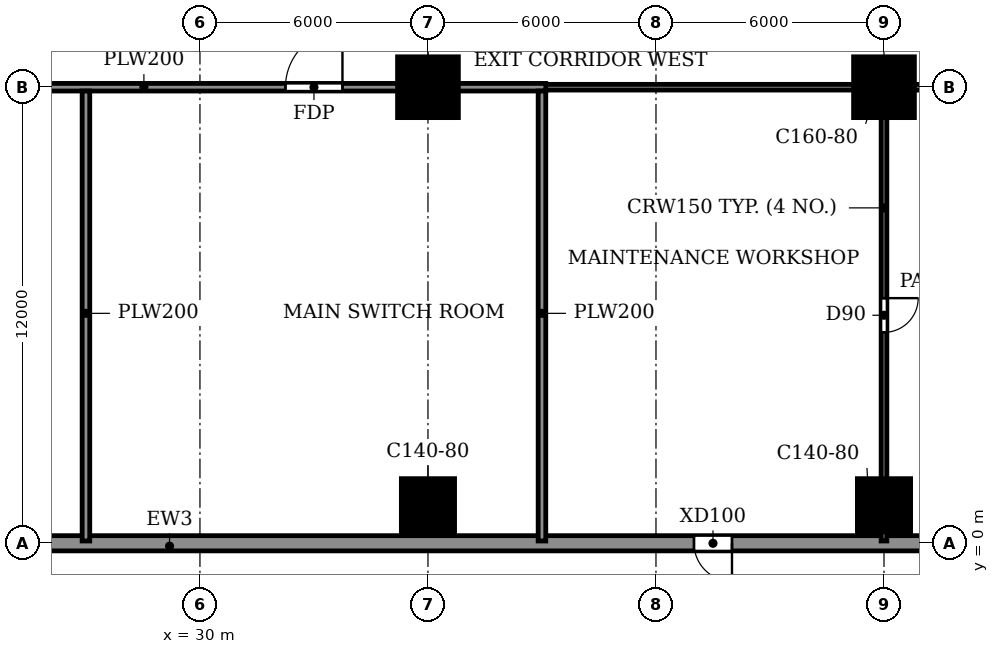
"""IFC4 building model, lengths in metres.
Left out: names, types, materials, properties, quantities, classifications, styles, units other than length and angle.
Written with IfcOpenShell. Run it as: python <this file> out.ifc"""

import sys

from ifc_helpers import new_model, si_unit, direction, frame, frame_2d, origin, origin_2d, place, context, subcontext, project, spatial, rectangle, extrude, source, transform, mapped, element, fill, save


model = new_model("IFC4")
c1 = context("Model", 3, precision=1e-05, world=origin(), true_north=direction((0.0, 1.0)))
c2 = subcontext(c1, "Body", "Model", "MODEL_VIEW")
j1 = project(units=[si_unit("LENGTHUNIT", "METRE"), si_unit("PLANEANGLEUNIT", "RADIAN")], contexts=[c1])
p1 = place(None, origin())
s1 = spatial("IfcSite", under=j1, at=p1, CompositionType="ELEMENT")
p2 = place(p1, origin())
s2 = spatial("IfcBuilding", under=s1, at=p2, CompositionType="ELEMENT")
p3 = place(p2, origin())
s3 = spatial("IfcBuildingStorey", under=s2, at=p3, CompositionType="ELEMENT", Elevation=0.0)
m1 = source(origin(), c2, "Body", "SweptSolid", [
    extrude(rectangle(XDim=1.4, YDim=1.4, at=origin_2d()), origin(), (0.0, 0.0, 1.0), 4.5),
])
p4 = place(p3, frame((36.0, 1.0, -0.3), z_axis=(0.0, 0.0, 1.0), x_axis=(1.0, 0.0, 0.0)))
e1 = element("IfcColumn", 1, at=p4, inside=s3, PredefinedType="COLUMN", context=c2, shape_type="MappedRepresentation", body=[
    mapped(m1, transform((0.0, 0.0, 0.0))),
])
m2 = source(origin(), c2, "Body", "SweptSolid", [
    extrude(rectangle(XDim=1.6, YDim=1.6, at=origin_2d()), origin(), (0.0, 0.0, 1.0), 4.5),
])
p5 = place(p3, frame((36.0, 12.0, -0.3), z_axis=(0.0, 0.0, 1.0), x_axis=(1.0, 0.0, 0.0)))
e2 = element("IfcColumn", 2, at=p5, inside=s3, PredefinedType="COLUMN", context=c2, shape_type="MappedRepresentation", body=[
    mapped(m2, transform((0.0, 0.0, 0.0))),
])
p6 = place(p3, frame((48.0, 1.0, -0.3), z_axis=(0.0, 0.0, 1.0), x_axis=(1.0, 0.0, 0.0)))
e3 = element("IfcColumn", 3, at=p6, inside=s3, PredefinedType="COLUMN", context=c2, shape_type="MappedRepresentation", body=[
    mapped(m1, transform((0.0, 0.0, 0.0))),
])
p7 = place(p3, frame((48.0, 12.0, -0.3), z_axis=(0.0, 0.0, 1.0), x_axis=(1.0, 0.0, 0.0)))
e4 = element("IfcColumn", 4, at=p7, inside=s3, PredefinedType="COLUMN", context=c2, shape_type="MappedRepresentation", body=[
    mapped(m2, transform((0.0, 0.0, 0.0))),
])
p8 = place(p3, frame((-0.2, 0.0, 0.0), z_axis=(0.0, 0.0, 1.0), x_axis=(1.0, 0.0, 0.0)))
e5 = element("IfcWall", 5, at=p8, inside=s3, PredefinedType="STANDARD", context=c2, shape_type="SweptSolid", body=[
    extrude(rectangle(XDim=102.4, YDim=0.4, at=frame_2d((51.2, 0.0))), origin(), (0.0, 0.0, 1.0), 4.2),
])
p9 = place(p8, frame((13.6, 0.0, 0.0)))
e6 = element("IfcOpeningElement", 6, at=p9, cuts=e5, PredefinedType="OPENING", context=c2, shape_type="SweptSolid", body=[
    extrude(rectangle(XDim=2.0, YDim=2.4, at=frame_2d((1.0, 1.2))), frame((0.0, 0.21, 0.0), z_axis=(0.0, -1.0, 0.0), x_axis=(1.0, 0.0, 0.0)), (0.0, 0.0, 1.0), 0.42),
])
p10 = place(p8, frame((43.2, 0.0, 0.0)))
e7 = element("IfcOpeningElement", 7, at=p10, cuts=e5, PredefinedType="OPENING", context=c2, shape_type="SweptSolid", body=[
    extrude(rectangle(XDim=1.0, YDim=2.1, at=frame_2d((0.5, 1.05))), frame((0.0, 0.21, 0.0), z_axis=(0.0, -1.0, 0.0), x_axis=(1.0, 0.0, 0.0)), (0.0, 0.0, 1.0), 0.42),
])
p11 = place(p8, frame((49.6, 0.0, 0.0)))
e8 = element("IfcOpeningElement", 8, at=p11, cuts=e5, PredefinedType="OPENING", context=c2, shape_type="SweptSolid", body=[
    extrude(rectangle(XDim=2.0, YDim=2.4, at=frame_2d((1.0, 1.2))), frame((0.0, 0.21, 0.0), z_axis=(0.0, -1.0, 0.0), x_axis=(1.0, 0.0, 0.0)), (0.0, 0.0, 1.0), 0.42),
])
p12 = place(p8, frame((55.2, 0.0, 0.0)))
e9 = element("IfcOpeningElement", 9, at=p12, cuts=e5, PredefinedType="OPENING", context=c2, shape_type="SweptSolid", body=[
    extrude(rectangle(XDim=1.0, YDim=2.1, at=frame_2d((0.5, 1.05))), frame((0.0, 0.21, 0.0), z_axis=(0.0, -1.0, 0.0), x_axis=(1.0, 0.0, 0.0)), (0.0, 0.0, 1.0), 0.42),
])
p13 = place(p8, frame((65.2, 0.0, 0.0)))
e10 = element("IfcOpeningElement", 10, at=p13, cuts=e5, PredefinedType="OPENING", context=c2, shape_type="SweptSolid", body=[
    extrude(rectangle(XDim=2.0, YDim=2.4, at=frame_2d((1.0, 1.2))), frame((0.0, 0.21, 0.0), z_axis=(0.0, -1.0, 0.0), x_axis=(1.0, 0.0, 0.0)), (0.0, 0.0, 1.0), 0.42),
])
p14 = place(p8, frame((77.2, 0.0, 0.0)))
e11 = element("IfcOpeningElement", 11, at=p14, cuts=e5, PredefinedType="OPENING", context=c2, shape_type="SweptSolid", body=[
    extrude(rectangle(XDim=2.0, YDim=2.4, at=frame_2d((1.0, 1.2))), frame((0.0, 0.21, 0.0), z_axis=(0.0, -1.0, 0.0), x_axis=(1.0, 0.0, 0.0)), (0.0, 0.0, 1.0), 0.42),
])
p15 = place(p8, frame((86.2, 0.0, 0.0)))
e12 = element("IfcOpeningElement", 12, at=p15, cuts=e5, PredefinedType="OPENING", context=c2, shape_type="SweptSolid", body=[
    extrude(rectangle(XDim=2.0, YDim=2.4, at=frame_2d((1.0, 1.2))), frame((0.0, 0.21, 0.0), z_axis=(0.0, -1.0, 0.0), x_axis=(1.0, 0.0, 0.0)), (0.0, 0.0, 1.0), 0.42),
])
p16 = place(p8, frame((90.7, 0.0, 0.0)))
e13 = element("IfcOpeningElement", 13, at=p16, cuts=e5, PredefinedType="OPENING", context=c2, shape_type="SweptSolid", body=[
    extrude(rectangle(XDim=2.0, YDim=2.4, at=frame_2d((1.0, 1.2))), frame((0.0, 0.21, 0.0), z_axis=(0.0, -1.0, 0.0), x_axis=(1.0, 0.0, 0.0)), (0.0, 0.0, 1.0), 0.42),
])
p17 = place(p8, frame((98.2, 0.0, 0.0)))
e14 = element("IfcOpeningElement", 14, at=p17, cuts=e5, PredefinedType="OPENING", context=c2, shape_type="SweptSolid", body=[
    extrude(rectangle(XDim=2.0, YDim=2.4, at=frame_2d((1.0, 1.2))), frame((0.0, 0.21, 0.0), z_axis=(0.0, -1.0, 0.0), x_axis=(1.0, 0.0, 0.0)), (0.0, 0.0, 1.0), 0.42),
])
p18 = place(p3, frame((38.9, 12.0, 0.0), z_axis=(0.0, 0.0, 1.0), x_axis=(1.0, 0.0, 0.0)))
e15 = element("IfcWall", 15, at=p18, inside=s3, PredefinedType="PARTITIONING", context=c2, shape_type="SweptSolid", body=[
    extrude(rectangle(XDim=63.1, YDim=0.15, at=frame_2d((31.55, 0.0))), origin(), (0.0, 0.0, 1.0), 4.2),
])
p19 = place(p18, frame((10.2, 0.0, 0.0)))
e16 = element("IfcOpeningElement", 16, at=p19, cuts=e15, PredefinedType="OPENING", context=c2, shape_type="SweptSolid", body=[
    extrude(rectangle(XDim=1.8, YDim=2.1, at=frame_2d((0.9, 1.05))), frame((0.0, 0.085, 0.0), z_axis=(0.0, -1.0, 0.0), x_axis=(1.0, 0.0, 0.0)), (0.0, 0.0, 1.0), 0.17),
])
p20 = place(p18, frame((23.65, 0.0, 0.0)))
e17 = element("IfcOpeningElement", 17, at=p20, cuts=e15, PredefinedType="OPENING", context=c2, shape_type="SweptSolid", body=[
    extrude(rectangle(XDim=0.9, YDim=2.1, at=frame_2d((0.45, 1.05))), frame((0.0, 0.085, 0.0), z_axis=(0.0, -1.0, 0.0), x_axis=(1.0, 0.0, 0.0)), (0.0, 0.0, 1.0), 0.17),
])
p21 = place(p18, frame((38.65, 0.0, 0.0)))
e18 = element("IfcOpeningElement", 18, at=p21, cuts=e15, PredefinedType="OPENING", context=c2, shape_type="SweptSolid", body=[
    extrude(rectangle(XDim=0.9, YDim=2.1, at=frame_2d((0.45, 1.05))), frame((0.0, 0.085, 0.0), z_axis=(0.0, -1.0, 0.0), x_axis=(1.0, 0.0, 0.0)), (0.0, 0.0, 1.0), 0.17),
])
p22 = place(p18, frame((51.7, 0.0, 0.0)))
e19 = element("IfcOpeningElement", 19, at=p22, cuts=e15, PredefinedType="OPENING", context=c2, shape_type="SweptSolid", body=[
    extrude(rectangle(XDim=1.8, YDim=2.1, at=frame_2d((0.9, 1.05))), frame((0.0, 0.085, 0.0), z_axis=(0.0, -1.0, 0.0), x_axis=(1.0, 0.0, 0.0)), (0.0, 0.0, 1.0), 0.17),
])
p23 = place(p3, frame((48.0, 0.06, 0.0), z_axis=(0.0, 0.0, 1.0), x_axis=(0.0, 1.0, 0.0)))
e20 = element("IfcWall", 20, at=p23, inside=s3, PredefinedType="PARTITIONING", context=c2, shape_type="SweptSolid", body=[
    extrude(rectangle(XDim=11.865, YDim=0.15, at=frame_2d((5.933, 0.0))), origin(), (0.0, 0.0, 1.0), 4.2),
])
p24 = place(p23, frame((5.49, 0.0, 0.0)))
e21 = element("IfcOpeningElement", 21, at=p24, cuts=e20, PredefinedType="OPENING", context=c2, shape_type="SweptSolid", body=[
    extrude(rectangle(XDim=0.9, YDim=2.1, at=frame_2d((0.45, 1.05))), frame((0.0, 0.085, 0.0), z_axis=(0.0, -1.0, 0.0), x_axis=(1.0, 0.0, 0.0)), (0.0, 0.0, 1.0), 0.17),
])
p25 = place(p3, frame((15.9, 12.0, 0.0), z_axis=(0.0, 0.0, 1.0), x_axis=(1.0, 0.0, 0.0)))
e22 = element("IfcWall", 22, at=p25, inside=s3, PredefinedType="PARTITIONING", context=c2, shape_type="SweptSolid", body=[
    extrude(rectangle(XDim=23.2, YDim=0.2, at=frame_2d((11.6, 0.0))), origin(), (0.0, 0.0, 1.0), 4.2),
])
p26 = place(p25, frame((16.35, 0.0, 0.0)))
e23 = element("IfcOpeningElement", 23, at=p26, cuts=e22, PredefinedType="OPENING", context=c2, shape_type="SweptSolid", body=[
    extrude(rectangle(XDim=1.5, YDim=2.1, at=frame_2d((0.75, 1.05))), frame((0.0, 0.11, 0.0), z_axis=(0.0, -1.0, 0.0), x_axis=(1.0, 0.0, 0.0)), (0.0, 0.0, 1.0), 0.22),
])
for number, where, z_axis, x_axis in (
    (24, (27.0, 0.06, 0.0), (0.0, 0.0, 1.0), (0.0, 1.0, 0.0)),
    (25, (39.0, 0.06, 0.0), (0.0, 0.0, 1.0), (0.0, 1.0, 0.0)),
):
    element("IfcWall", number, at=place(p3, frame(where, z_axis=z_axis, x_axis=x_axis)), inside=s3, PredefinedType="PARTITIONING", context=c2, shape_type="SweptSolid", body=[
        extrude(rectangle(XDim=11.84, YDim=0.2, at=frame_2d((5.92, 0.0))), origin(), (0.0, 0.0, 1.0), 4.2),
    ])
p27 = place(p10, frame((1.0, 0.0, 0.0), z_axis=(0.0, 0.0, 1.0), x_axis=(-1.0, 0.0, 0.0)))
e26 = element("IfcDoor", 26, at=p27, inside=s3, OperationType="SINGLE_SWING_LEFT", PredefinedType="DOOR", context=c2, shape_type="SweptSolid", body=[
    extrude(rectangle(XDim=1.0, YDim=2.1, at=frame_2d((0.5, 1.05))), frame((0.0, 0.025, 0.0), z_axis=(0.0, -1.0, 0.0), x_axis=(1.0, 0.0, 0.0)), (0.0, 0.0, 1.0), 0.05),
])
fill(e7, e26)
p28 = place(p24, frame((0.9, 0.0, 0.0), z_axis=(0.0, 0.0, 1.0), x_axis=(-1.0, 0.0, 0.0)))
e27 = element("IfcDoor", 27, at=p28, inside=s3, OperationType="SINGLE_SWING_LEFT", PredefinedType="DOOR", context=c2, shape_type="SweptSolid", body=[
    extrude(rectangle(XDim=0.9, YDim=2.1, at=frame_2d((0.45, 1.05))), frame((0.0, 0.025, 0.0), z_axis=(0.0, -1.0, 0.0), x_axis=(1.0, 0.0, 0.0)), (0.0, 0.0, 1.0), 0.05),
])
fill(e21, e27)
p29 = place(p26, origin())
e28 = element("IfcDoor", 28, at=p29, inside=s3, OperationType="DOUBLE_DOOR_SINGLE_SWING", PredefinedType="DOOR", context=c2, shape_type="SweptSolid", body=[
    extrude(rectangle(XDim=1.5, YDim=2.1, at=frame_2d((0.75, 1.05))), frame((0.0, 0.025, 0.0), z_axis=(0.0, -1.0, 0.0), x_axis=(1.0, 0.0, 0.0)), (0.0, 0.0, 1.0), 0.05),
])
fill(e23, e28)
save(model, sys.argv[1])
